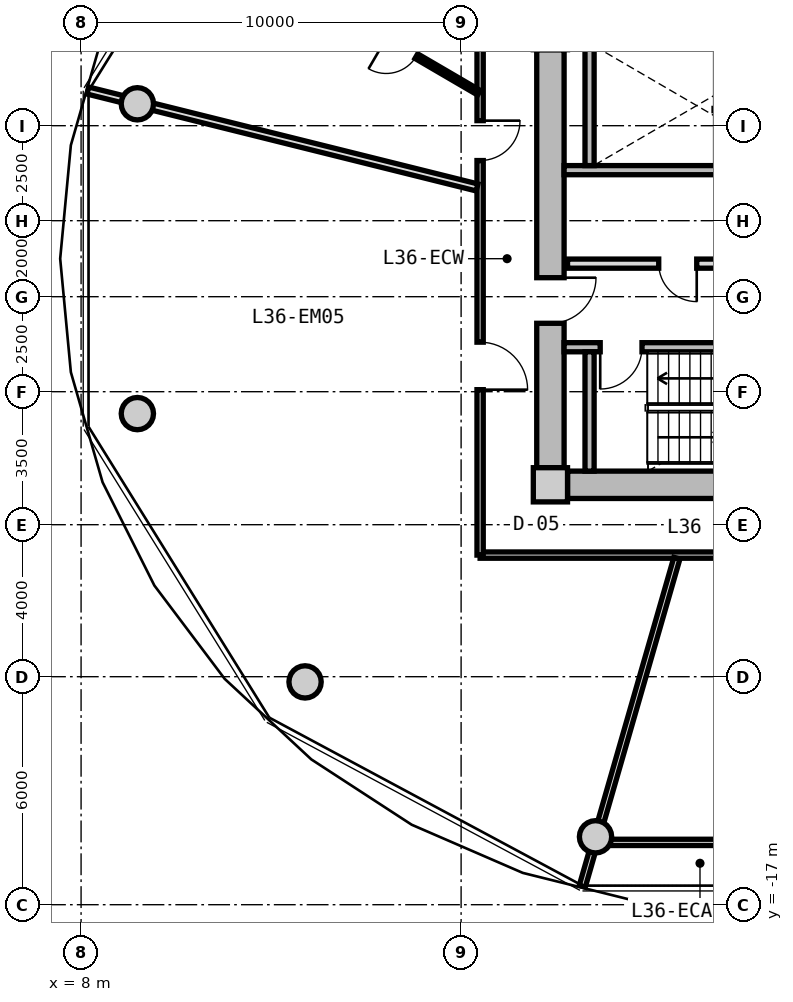
"""IFC4 building model, lengths in metres.
Left out: names, types, materials, properties, quantities, classifications, styles, units other than length and angle.
Written with IfcOpenShell. Run it as: python <this file> out.ifc"""

import sys

from ifc_helpers import new_model, si_unit, direction, frame, frame_2d, origin, origin_2d, place, context, subcontext, project, spatial, rectangle, circle, extrude, source, transform, mapped, element, fill, save


model = new_model("IFC4")
c1 = context("Model", 3, precision=1e-05, world=origin(), true_north=direction((0.0, 1.0)))
c2 = subcontext(c1, "Body", "Model", "MODEL_VIEW")
j1 = project(units=[si_unit("LENGTHUNIT", "METRE"), si_unit("PLANEANGLEUNIT", "RADIAN")], contexts=[c1])
p1 = place(None, origin())
s1 = spatial("IfcSite", under=j1, at=p1, CompositionType="ELEMENT")
p2 = place(p1, origin())
s2 = spatial("IfcBuilding", under=s1, at=p2, CompositionType="ELEMENT")
p3 = place(p2, frame((0.0, 0.0, 117.6)))
s3 = spatial("IfcBuildingStorey", under=s2, at=p3, CompositionType="ELEMENT", Elevation=117.6)
m1 = source(origin(), c2, "Body", "SweptSolid", [
    extrude(rectangle(XDim=0.9, YDim=0.9, at=origin_2d()), origin(), (0.0, 0.0, 1.0), 3.05),
])
p4 = place(p3, frame((20.35, -5.95, 0.0), z_axis=(0.0, 0.0, 1.0), x_axis=(1.0, 0.0, 0.0)))
e1 = element("IfcColumn", 1, at=p4, inside=s3, PredefinedType="COLUMN", context=c2, shape_type="MappedRepresentation", body=[
    mapped(m1, transform((0.0, 0.0, 0.0), x_axis=(1.0, 0.0, 0.0), y_axis=(0.0, 1.0, 0.0), z_axis=(0.0, 0.0, 1.0), scale=1.0)),
])
m2 = source(origin(), c2, "Body", "SweptSolid", [
    extrude(rectangle(XDim=14.4, YDim=0.72, at=frame_2d((7.2, 0.0))), origin(), (0.0, 0.0, 1.0), 2.79),
])
p5 = place(p3, frame((35.2, -5.95, 0.0), z_axis=(0.0, 0.0, 1.0), x_axis=(-1.0, 0.0, 0.0)))
e2 = element("IfcWall", 2, at=p5, inside=s3, PredefinedType="SHEAR", context=c2, shape_type="MappedRepresentation", body=[
    mapped(m2, transform((0.0, 0.0, 0.0), x_axis=(1.0, 0.0, 0.0), y_axis=(0.0, 1.0, 0.0), z_axis=(0.0, 0.0, 1.0), scale=1.0)),
])
m3 = source(origin(), c2, "Body", "SweptSolid", [
    extrude(rectangle(XDim=11.0, YDim=0.72, at=frame_2d((5.5, 0.0))), origin(), (0.0, 0.0, 1.0), 2.79),
])
p6 = place(p3, frame((20.35, -5.5, 0.0), z_axis=(0.0, 0.0, 1.0), x_axis=(0.0, 1.0, 0.0)))
e3 = element("IfcWall", 3, at=p6, inside=s3, PredefinedType="SHEAR", context=c2, shape_type="MappedRepresentation", body=[
    mapped(m3, transform((0.0, 0.0, 0.0), x_axis=(1.0, 0.0, 0.0), y_axis=(0.0, 1.0, 0.0), z_axis=(0.0, 0.0, 1.0), scale=1.0)),
])
p7 = place(p6, frame((3.8, 0.0, 0.0)))
e4 = element("IfcOpeningElement", 4, at=p7, cuts=e3, PredefinedType="OPENING", context=c2, shape_type="SweptSolid", body=[
    extrude(rectangle(XDim=1.2, YDim=2.15, at=frame_2d((0.6, 1.075))), frame((0.0, 0.37, 0.0), z_axis=(0.0, -1.0, 0.0), x_axis=(1.0, 0.0, 0.0)), (0.0, 0.0, 1.0), 0.74),
])
m4 = source(origin(), c2, "Body", "SweptSolid", [
    extrude(circle(Radius=0.425, at=origin_2d()), origin(), (0.0, 0.0, 1.0), 3.05),
])
for number, where, z_axis, x_axis in (
    (5, (9.481, 4.076, 0.0), (0.0, 0.0, 1.0), (1.0, 0.0, 0.0)),
    (6, (9.481, -4.076, 0.0), (0.0, 0.0, 1.0), (1.0, 0.0, 0.0)),
    (7, (13.894, -11.137, 0.0), (0.0, 0.0, 1.0), (1.0, 0.0, 0.0)),
    (8, (21.537, -15.213, 0.0), (0.0, 0.0, 1.0), (1.0, 0.0, 0.0)),
):
    element("IfcColumn", number, at=place(p3, frame(where, z_axis=z_axis, x_axis=x_axis)), inside=s3, PredefinedType="COLUMN", context=c2, shape_type="MappedRepresentation", body=[
        mapped(m4, transform((0.0, 0.0, 0.0), x_axis=(1.0, 0.0, 0.0), y_axis=(0.0, 1.0, 0.0), z_axis=(0.0, 0.0, 1.0), scale=1.0)),
    ])
m5 = source(origin(), c2, "Body", "SweptSolid", [
    extrude(rectangle(XDim=7.83, YDim=0.24, at=frame_2d((3.915, 0.0))), origin(), (0.0, 0.0, 1.0), 2.79),
])
p8 = place(p3, frame((20.71, 2.33, 0.0), z_axis=(0.0, 0.0, 1.0), x_axis=(1.0, 0.0, 0.0)))
e9 = element("IfcWall", 9, at=p8, inside=s3, PredefinedType="PARTITIONING", context=c2, shape_type="MappedRepresentation", body=[
    mapped(m5, transform((0.0, 0.0, 0.0), x_axis=(1.0, 0.0, 0.0), y_axis=(0.0, 1.0, 0.0), z_axis=(0.0, 0.0, 1.0), scale=1.0)),
])
m6 = source(origin(), c2, "Body", "SweptSolid", [
    extrude(rectangle(XDim=3.14, YDim=0.24, at=frame_2d((1.57, 0.0))), origin(), (0.0, 0.0, 1.0), 2.79),
])
p9 = place(p3, frame((21.38, 2.45, 0.0), z_axis=(0.0, 0.0, 1.0), x_axis=(0.0, 1.0, 0.0)))
e10 = element("IfcWall", 10, at=p9, inside=s3, PredefinedType="PARTITIONING", context=c2, shape_type="MappedRepresentation", body=[
    mapped(m6, transform((0.0, 0.0, 0.0), x_axis=(1.0, 0.0, 0.0), y_axis=(0.0, 1.0, 0.0), z_axis=(0.0, 0.0, 1.0), scale=1.0)),
])
p10 = place(p3, frame((20.71, -2.33, 0.0), z_axis=(0.0, 0.0, 1.0), x_axis=(1.0, 0.0, 0.0)))
e11 = element("IfcWall", 11, at=p10, inside=s3, PredefinedType="PARTITIONING", context=c2, shape_type="MappedRepresentation", body=[
    mapped(m5, transform((0.0, 0.0, 0.0), x_axis=(1.0, 0.0, 0.0), y_axis=(0.0, 1.0, 0.0), z_axis=(0.0, 0.0, 1.0), scale=1.0)),
])
p11 = place(p10, frame((0.95, 0.0, 0.0)))
e12 = element("IfcOpeningElement", 12, at=p11, cuts=e11, PredefinedType="OPENING", context=c2, shape_type="SweptSolid", body=[
    extrude(rectangle(XDim=1.1, YDim=2.15, at=frame_2d((0.55, 1.075))), frame((0.0, 0.13, 0.0), z_axis=(0.0, -1.0, 0.0), x_axis=(1.0, 0.0, 0.0)), (0.0, 0.0, 1.0), 0.26),
])
p12 = place(p3, frame((21.38, -5.59, 0.0), z_axis=(0.0, 0.0, 1.0), x_axis=(0.0, 1.0, 0.0)))
e13 = element("IfcWall", 13, at=p12, inside=s3, PredefinedType="PARTITIONING", context=c2, shape_type="MappedRepresentation", body=[
    mapped(m6, transform((0.0, 0.0, 0.0), x_axis=(1.0, 0.0, 0.0), y_axis=(0.0, 1.0, 0.0), z_axis=(0.0, 0.0, 1.0), scale=1.0)),
])
m7 = source(origin(), c2, "Body", "SweptSolid", [
    extrude(rectangle(XDim=7.62, YDim=0.24, at=frame_2d((3.81, 0.0))), origin(), (0.0, 0.0, 1.0), 2.775),
])
p13 = place(p3, frame((20.8, -0.13, 0.0), z_axis=(0.0, 0.0, 1.0), x_axis=(1.0, 0.0, 0.0)))
e14 = element("IfcWall", 14, at=p13, inside=s3, PredefinedType="PARTITIONING", context=c2, shape_type="MappedRepresentation", body=[
    mapped(m7, transform((0.0, 0.0, 0.0), x_axis=(1.0, 0.0, 0.0), y_axis=(0.0, 1.0, 0.0), z_axis=(0.0, 0.0, 1.0), scale=1.0)),
])
p14 = place(p13, frame((6.22, 0.0, 0.0)))
e15 = element("IfcOpeningElement", 15, at=p14, cuts=e14, PredefinedType="OPENING", context=c2, shape_type="SweptSolid", body=[
    extrude(rectangle(XDim=1.0, YDim=2.1, at=frame_2d((0.5, 1.05))), frame((0.0, 0.13, 0.0), z_axis=(0.0, -1.0, 0.0), x_axis=(1.0, 0.0, 0.0)), (0.0, 0.0, 1.0), 0.26),
])
p15 = place(p13, frame((2.4, 0.0, 0.0)))
e16 = element("IfcOpeningElement", 16, at=p15, cuts=e14, PredefinedType="OPENING", context=c2, shape_type="SweptSolid", body=[
    extrude(rectangle(XDim=1.0, YDim=2.1, at=frame_2d((0.5, 1.05))), frame((0.0, 0.13, 0.0), z_axis=(0.0, -1.0, 0.0), x_axis=(1.0, 0.0, 0.0)), (0.0, 0.0, 1.0), 0.26),
])
m8 = source(origin(), c2, "Body", "SweptSolid", [
    extrude(rectangle(XDim=8.6, YDim=0.165, at=frame_2d((4.3, 0.0))), origin(), (0.0, 0.0, 1.0), 2.775),
])
p16 = place(p3, frame((27.1, -7.8, 0.0), z_axis=(0.0, 0.0, 1.0), x_axis=(-1.0, 0.0, 0.0)))
e17 = element("IfcWall", 17, at=p16, inside=s3, PredefinedType="PARTITIONING", context=c2, shape_type="MappedRepresentation", body=[
    mapped(m8, transform((0.0, 0.0, 0.0), x_axis=(1.0, 0.0, 0.0), y_axis=(0.0, 1.0, 0.0), z_axis=(0.0, 0.0, 1.0), scale=1.0)),
])
m9 = source(origin(), c2, "Body", "SweptSolid", [
    extrude(rectangle(XDim=15.6, YDim=0.165, at=frame_2d((7.8, 0.0))), origin(), (0.0, 0.0, 1.0), 2.775),
])
p17 = place(p3, frame((18.5, -7.8, 0.0), z_axis=(0.0, 0.0, 1.0), x_axis=(0.0, 1.0, 0.0)))
e18 = element("IfcWall", 18, at=p17, inside=s3, PredefinedType="PARTITIONING", context=c2, shape_type="MappedRepresentation", body=[
    mapped(m9, transform((0.0, 0.0, 0.0), x_axis=(1.0, 0.0, 0.0), y_axis=(0.0, 1.0, 0.0), z_axis=(0.0, 0.0, 1.0), scale=1.0)),
])
p18 = place(p17, frame((10.383, 0.0, 0.0)))
e19 = element("IfcOpeningElement", 19, at=p18, cuts=e18, PredefinedType="OPENING", context=c2, shape_type="SweptSolid", body=[
    extrude(rectangle(XDim=1.05, YDim=2.15, at=frame_2d((0.525, 1.075))), frame((0.0, 0.093, 0.0), z_axis=(0.0, -1.0, 0.0), x_axis=(1.0, 0.0, 0.0)), (0.0, 0.0, 1.0), 0.185),
])
p19 = place(p17, frame((4.353, 0.0, 0.0)))
e20 = element("IfcOpeningElement", 20, at=p19, cuts=e18, PredefinedType="OPENING", context=c2, shape_type="SweptSolid", body=[
    extrude(rectangle(XDim=1.25, YDim=2.2, at=frame_2d((0.625, 1.1))), frame((0.0, 0.093, 0.0), z_axis=(0.0, -1.0, 0.0), x_axis=(1.0, 0.0, 0.0)), (0.0, 0.0, 1.0), 0.185),
])
m10 = source(origin(), c2, "Body", "SweptSolid", [
    extrude(rectangle(XDim=8.989, YDim=0.165, at=frame_2d((4.495, 0.0))), origin(), (0.0, 0.0, 1.0), 2.275),
])
p20 = place(p3, frame((23.678, -7.88, 0.0), z_axis=(0.0, 0.0, 1.0), x_axis=(-0.27702323008, -0.960863221274, 0.0)))
e21 = element("IfcWall", 21, at=p20, inside=s3, PredefinedType="PARTITIONING", context=c2, shape_type="MappedRepresentation", body=[
    mapped(m10, transform((0.0, 0.0, 0.0), x_axis=(1.0, 0.0, 0.0), y_axis=(0.0, 1.0, 0.0), z_axis=(0.0, 0.0, 1.0), scale=1.0)),
])
m11 = source(origin(), c2, "Body", "SweptSolid", [
    extrude(rectangle(XDim=5.814, YDim=0.165, at=frame_2d((2.907, 0.0))), origin(), (0.0, 0.0, 1.0), 2.275),
])
p21 = place(p3, frame((21.366, -15.36, 0.0), z_axis=(0.0, 0.0, 1.0), x_axis=(1.0, 0.0, 0.0)))
e22 = element("IfcWall", 22, at=p21, inside=s3, PredefinedType="PARTITIONING", context=c2, shape_type="MappedRepresentation", body=[
    mapped(m11, transform((0.0, 0.0, 0.0), x_axis=(1.0, 0.0, 0.0), y_axis=(0.0, 1.0, 0.0), z_axis=(0.0, 0.0, 1.0), scale=1.0)),
])
m12 = source(origin(), c2, "Body", "SweptSolid", [
    extrude(rectangle(XDim=10.556, YDim=0.19, at=frame_2d((5.278, 0.0))), origin(), (0.0, 0.0, 1.0), 2.275),
])
p22 = place(p3, frame((18.42, 1.875, 0.0), z_axis=(0.0, 0.0, 1.0), x_axis=(-0.970363857851, 0.241648470667, 0.0)))
e23 = element("IfcWall", 23, at=p22, inside=s3, PredefinedType="PARTITIONING", context=c2, shape_type="MappedRepresentation", body=[
    mapped(m12, transform((0.0, 0.0, 0.0), x_axis=(1.0, 0.0, 0.0), y_axis=(0.0, 1.0, 0.0), z_axis=(0.0, 0.0, 1.0), scale=1.0)),
])
m13 = source(origin(), c2, "Body", "SweptSolid", [
    extrude(rectangle(XDim=4.735, YDim=0.14, at=frame_2d((2.368, 0.0))), origin(), (0.0, 0.0, 1.0), 2.775),
])
p23 = place(p3, frame((18.47, 4.368, 0.0), z_axis=(0.0, 0.0, 1.0), x_axis=(-0.863537576642, 0.504284496814, 0.0)))
e24 = element("IfcWall", 24, at=p23, inside=s3, PredefinedType="PARTITIONING", context=c2, shape_type="MappedRepresentation", body=[
    mapped(m13, transform((0.0, 0.0, 0.0), x_axis=(1.0, 0.0, 0.0), y_axis=(0.0, 1.0, 0.0), z_axis=(0.0, 0.0, 1.0), scale=1.0)),
])
p24 = place(p23, frame((1.908, 0.0, 0.0)))
e25 = element("IfcOpeningElement", 25, at=p24, cuts=e24, PredefinedType="OPENING", context=c2, shape_type="SweptSolid", body=[
    extrude(rectangle(XDim=0.92, YDim=2.1, at=frame_2d((0.46, 1.05))), frame((0.0, 0.08, 0.0), z_axis=(0.0, -1.0, 0.0), x_axis=(1.0, 0.0, 0.0)), (0.0, 0.0, 1.0), 0.16),
])
m14 = source(origin(), c2, "Body", "SweptSolid", [
    extrude(rectangle(XDim=1.1, YDim=2.15, at=frame_2d((0.55, 1.075))), frame((0.0, 0.025, 0.0), z_axis=(0.0, -1.0, 0.0), x_axis=(1.0, 0.0, 0.0)), (0.0, 0.0, 1.0), 0.05),
])
p25 = place(p11, frame((1.1, 0.0, 0.0), z_axis=(0.0, 0.0, 1.0), x_axis=(-1.0, 0.0, 0.0)))
e26 = element("IfcDoor", 26, at=p25, inside=s3, OperationType="SINGLE_SWING_RIGHT", PredefinedType="DOOR", context=c2, shape_type="MappedRepresentation", body=[
    mapped(m14, transform((0.0, 0.0, 0.0), x_axis=(1.0, 0.0, 0.0), y_axis=(0.0, 1.0, 0.0), z_axis=(0.0, 0.0, 1.0), scale=1.0)),
])
fill(e12, e26)
m15 = source(origin(), c2, "Body", "SweptSolid", [
    extrude(rectangle(XDim=1.2, YDim=2.15, at=frame_2d((0.6, 1.075))), frame((0.0, 0.025, 0.0), z_axis=(0.0, -1.0, 0.0), x_axis=(1.0, 0.0, 0.0)), (0.0, 0.0, 1.0), 0.05),
])
p26 = place(p7, frame((1.2, 0.0, 0.0), z_axis=(0.0, 0.0, 1.0), x_axis=(-1.0, 0.0, 0.0)))
e27 = element("IfcDoor", 27, at=p26, inside=s3, OperationType="SINGLE_SWING_LEFT", PredefinedType="DOOR", context=c2, shape_type="MappedRepresentation", body=[
    mapped(m15, transform((0.0, 0.0, 0.0), x_axis=(1.0, 0.0, 0.0), y_axis=(0.0, 1.0, 0.0), z_axis=(0.0, 0.0, 1.0), scale=1.0)),
])
fill(e4, e27)
m16 = source(origin(), c2, "Body", "SweptSolid", [
    extrude(rectangle(XDim=1.0, YDim=2.1, at=frame_2d((0.5, 1.05))), frame((0.0, 0.025, 0.0), z_axis=(0.0, -1.0, 0.0), x_axis=(1.0, 0.0, 0.0)), (0.0, 0.0, 1.0), 0.05),
])
p27 = place(p15, frame((1.0, 0.0, 0.0), z_axis=(0.0, 0.0, 1.0), x_axis=(-1.0, 0.0, 0.0)))
e28 = element("IfcDoor", 28, at=p27, inside=s3, OperationType="SINGLE_SWING_LEFT", PredefinedType="DOOR", context=c2, shape_type="MappedRepresentation", body=[
    mapped(m16, transform((0.0, 0.0, 0.0), x_axis=(1.0, 0.0, 0.0), y_axis=(0.0, 1.0, 0.0), z_axis=(0.0, 0.0, 1.0), scale=1.0)),
])
fill(e16, e28)
m17 = source(origin(), c2, "Body", "SweptSolid", [
    extrude(rectangle(XDim=1.05, YDim=2.15, at=frame_2d((0.525, 1.075))), frame((0.0, 0.025, 0.0), z_axis=(0.0, -1.0, 0.0), x_axis=(1.0, 0.0, 0.0)), (0.0, 0.0, 1.0), 0.05),
])
p28 = place(p18, frame((1.05, 0.0, 0.0), z_axis=(0.0, 0.0, 1.0), x_axis=(-1.0, 0.0, 0.0)))
e29 = element("IfcDoor", 29, at=p28, inside=s3, OperationType="SINGLE_SWING_LEFT", PredefinedType="DOOR", context=c2, shape_type="MappedRepresentation", body=[
    mapped(m17, transform((0.0, 0.0, 0.0), x_axis=(1.0, 0.0, 0.0), y_axis=(0.0, 1.0, 0.0), z_axis=(0.0, 0.0, 1.0), scale=1.0)),
])
fill(e19, e29)
m18 = source(origin(), c2, "Body", "SweptSolid", [
    extrude(rectangle(XDim=0.92, YDim=2.1, at=frame_2d((0.46, 1.05))), frame((0.0, 0.025, 0.0), z_axis=(0.0, -1.0, 0.0), x_axis=(1.0, 0.0, 0.0)), (0.0, 0.0, 1.0), 0.05),
])
p29 = place(p24, origin())
e30 = element("IfcDoor", 30, at=p29, inside=s3, OperationType="SINGLE_SWING_RIGHT", PredefinedType="DOOR", context=c2, shape_type="MappedRepresentation", body=[
    mapped(m18, transform((0.0, 0.0, 0.0), x_axis=(1.0, 0.0, 0.0), y_axis=(0.0, 1.0, 0.0), z_axis=(0.0, 0.0, 1.0), scale=1.0)),
])
fill(e25, e30)
m19 = source(origin(), c2, "Body", "SweptSolid", [
    extrude(rectangle(XDim=1.25, YDim=2.2, at=frame_2d((0.625, 1.1))), frame((0.0, 0.025, 0.0), z_axis=(0.0, -1.0, 0.0), x_axis=(1.0, 0.0, 0.0)), (0.0, 0.0, 1.0), 0.05),
])
p30 = place(p19, frame((1.25, 0.0, 0.0), z_axis=(0.0, 0.0, 1.0), x_axis=(-1.0, 0.0, 0.0)))
e31 = element("IfcDoor", 31, at=p30, inside=s3, OperationType="SINGLE_SWING_RIGHT", PredefinedType="DOOR", context=c2, shape_type="MappedRepresentation", body=[
    mapped(m19, transform((0.0, 0.0, 0.0), x_axis=(1.0, 0.0, 0.0), y_axis=(0.0, 1.0, 0.0), z_axis=(0.0, 0.0, 1.0), scale=1.0)),
])
fill(e20, e31)
save(model, sys.argv[1])
